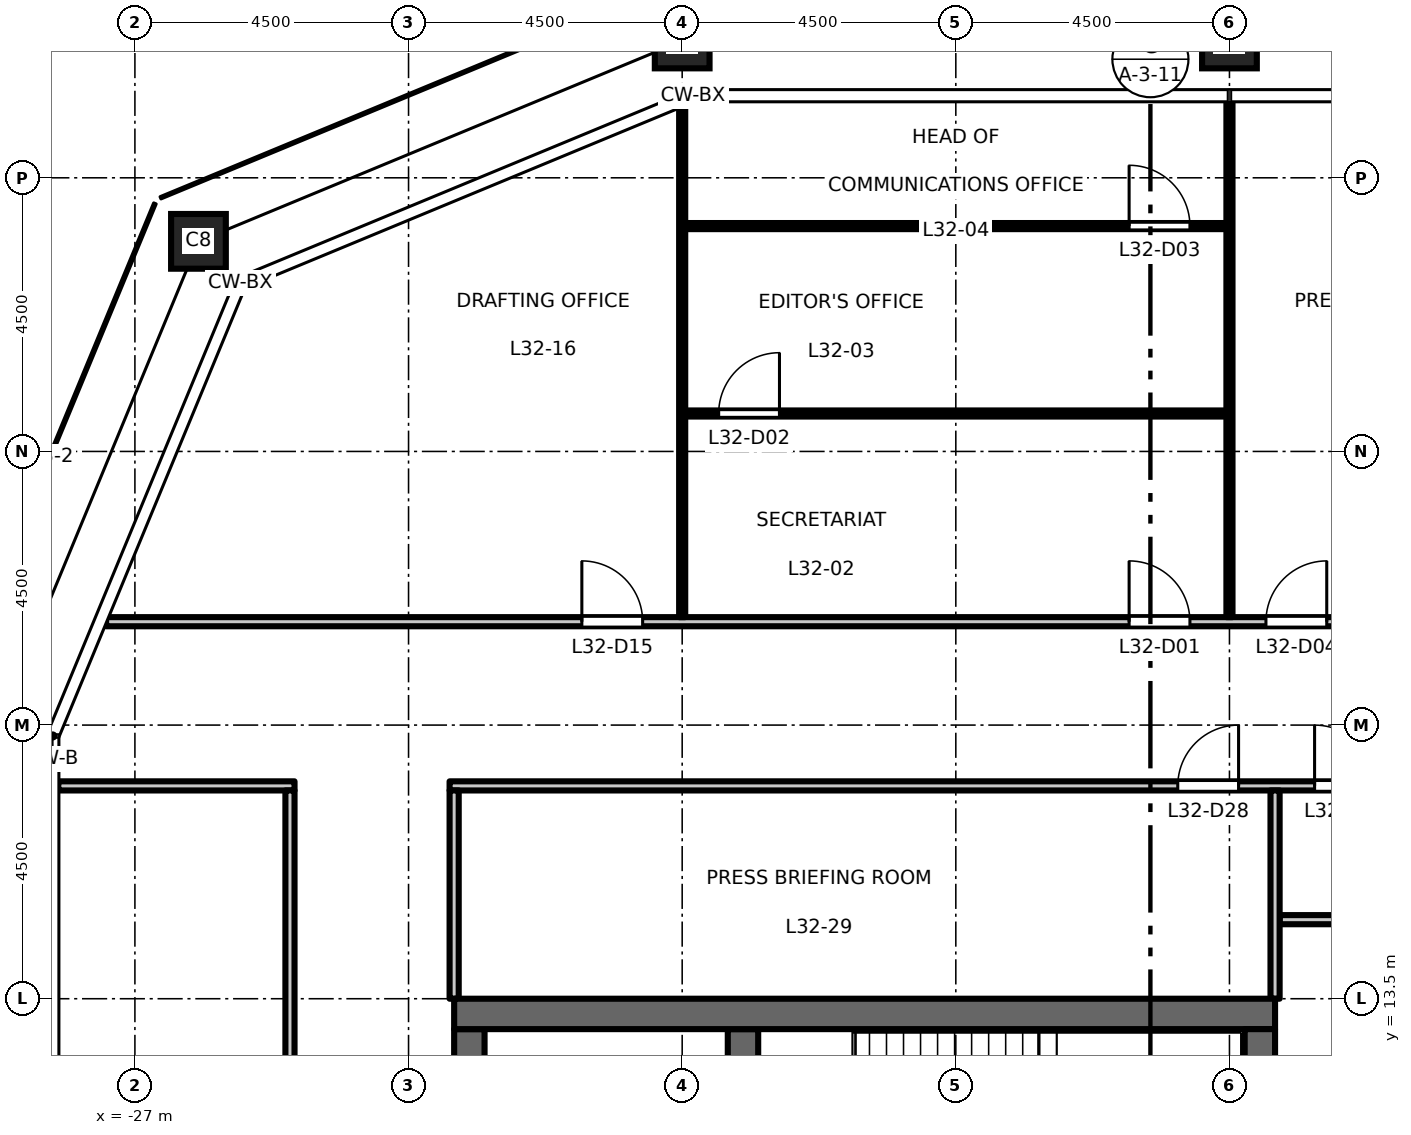
"""IFC4 building model, lengths in metres.
Left out: names, types, materials, properties, quantities, classifications, styles, units other than length and angle.
Written with IfcOpenShell. Run it as: python <this file> out.ifc"""

import sys

from ifc_helpers import new_model, si_unit, direction, frame, frame_2d, origin, origin_2d, place, context, subcontext, project, spatial, rectangle, hollow_rectangle, extrude, element, fill, save


model = new_model("IFC4")
c1 = context("Model", 3, precision=1e-05, world=origin(), true_north=direction((0.0, 1.0)))
c2 = subcontext(c1, "Body", "Model", "MODEL_VIEW")
j1 = project(units=[si_unit("LENGTHUNIT", "METRE"), si_unit("PLANEANGLEUNIT", "RADIAN")], contexts=[c1])
p1 = place(None, origin())
s1 = spatial("IfcSite", under=j1, at=p1, CompositionType="ELEMENT")
p2 = place(p1, origin())
s2 = spatial("IfcBuilding", under=s1, at=p2, CompositionType="ELEMENT")
p3 = place(p2, frame((0.0, 0.0, 149.7)))
s3 = spatial("IfcBuildingStorey", under=s2, at=p3, CompositionType="ELEMENT", Elevation=149.7)
for number, where, z_axis, x_axis in (
    (1, (-9.0, 29.25, 0.0), (0.0, 0.0, 1.0), (1.0, 0.0, 0.0)),
    (2, (-18.0, 29.25, 0.0), (0.0, 0.0, 1.0), (1.0, 0.0, 0.0)),
    (3, (-25.955, 25.955, 0.0), (0.0, 0.0, 1.0), (1.0, 0.0, 0.0)),
):
    element("IfcColumn", number, at=place(p3, frame(where, z_axis=z_axis, x_axis=x_axis)), inside=s3, PredefinedType="COLUMN", context=c2, shape_type="SweptSolid", body=[
        extrude(hollow_rectangle(XDim=0.9, YDim=0.9, WallThickness=0.05, at=origin_2d()), origin(), (0.0, 0.0, 1.0), 4.5),
    ])
p4 = place(p3, frame((-21.5, -13.0, 0.0), z_axis=(0.0, 0.0, 1.0), x_axis=(0.0, 1.0, 0.0)))
e4 = element("IfcWall", 4, at=p4, inside=s3, PredefinedType="SHEAR", context=c2, shape_type="SweptSolid", body=[
    extrude(rectangle(XDim=26.0, YDim=0.5, at=frame_2d((13.0, 0.0))), origin(), (0.0, 0.0, 1.0), 4.35),
])
p5 = place(p4, frame((16.825, 0.0, 0.0)))
e5 = element("IfcOpeningElement", 5, at=p5, cuts=e4, PredefinedType="OPENING", context=c2, shape_type="SweptSolid", body=[
    extrude(rectangle(XDim=1.8, YDim=2.1, at=frame_2d((0.9, 1.05))), frame((0.0, 0.26, 0.0), z_axis=(0.0, -1.0, 0.0), x_axis=(1.0, 0.0, 0.0)), (0.0, 0.0, 1.0), 0.52),
])
p6 = place(p4, frame((7.375, 0.0, 0.0)))
e6 = element("IfcOpeningElement", 6, at=p6, cuts=e4, PredefinedType="OPENING", context=c2, shape_type="SweptSolid", body=[
    extrude(rectangle(XDim=1.8, YDim=2.1, at=frame_2d((0.9, 1.05))), frame((0.0, 0.26, 0.0), z_axis=(0.0, -1.0, 0.0), x_axis=(1.0, 0.0, 0.0)), (0.0, 0.0, 1.0), 0.52),
])
p7 = place(p4, frame((1.3, 0.0, 0.0)))
e7 = element("IfcOpeningElement", 7, at=p7, cuts=e4, PredefinedType="OPENING", context=c2, shape_type="SweptSolid", body=[
    extrude(rectangle(XDim=0.9, YDim=2.1, at=frame_2d((0.45, 1.05))), frame((0.0, 0.26, 0.0), z_axis=(0.0, -1.0, 0.0), x_axis=(1.0, 0.0, 0.0)), (0.0, 0.0, 1.0), 0.52),
])
p8 = place(p3, frame((-17.0, 6.425, 0.0), z_axis=(0.0, 0.0, 1.0), x_axis=(0.0, 1.0, 0.0)))
e8 = element("IfcWall", 8, at=p8, inside=s3, PredefinedType="SHEAR", context=c2, shape_type="SweptSolid", body=[
    extrude(rectangle(XDim=6.575, YDim=0.5, at=frame_2d((3.288, 0.0))), origin(), (0.0, 0.0, 1.0), 4.35),
])
p9 = place(p3, frame((-8.25, 13.25, 0.0), z_axis=(0.0, 0.0, 1.0), x_axis=(-1.0, 0.0, 0.0)))
e9 = element("IfcWall", 9, at=p9, inside=s3, PredefinedType="SHEAR", context=c2, shape_type="SweptSolid", body=[
    extrude(rectangle(XDim=13.5, YDim=0.5, at=frame_2d((6.75, 0.0))), origin(), (0.0, 0.0, 1.0), 4.35),
])
p10 = place(p3, frame((-8.5, -13.0, 0.0), z_axis=(0.0, 0.0, 1.0), x_axis=(0.0, 1.0, 0.0)))
e10 = element("IfcWall", 10, at=p10, inside=s3, PredefinedType="SHEAR", context=c2, shape_type="SweptSolid", body=[
    extrude(rectangle(XDim=26.0, YDim=0.5, at=frame_2d((13.0, 0.0))), origin(), (0.0, 0.0, 1.0), 4.35),
])
p11 = place(p3, frame((-8.175, 14.8, 0.0), z_axis=(0.0, 0.0, 1.0), x_axis=(1.0, 0.0, 0.0)))
e11 = element("IfcWall", 11, at=p11, inside=s3, PredefinedType="PARTITIONING", context=c2, shape_type="SweptSolid", body=[
    extrude(rectangle(XDim=14.955, YDim=0.15, at=frame_2d((7.478, 0.0))), origin(), (0.0, 0.0, 1.0), 4.35),
])
p12 = place(p11, frame((4.325, 0.0, 0.0)))
e12 = element("IfcOpeningElement", 12, at=p12, cuts=e11, PredefinedType="OPENING", context=c2, shape_type="SweptSolid", body=[
    extrude(rectangle(XDim=1.0, YDim=2.1, at=frame_2d((0.5, 1.05))), frame((0.0, 0.085, 0.0), z_axis=(0.0, -1.0, 0.0), x_axis=(1.0, 0.0, 0.0)), (0.0, 0.0, 1.0), 0.17),
])
p13 = place(p11, frame((6.575, 0.0, 0.0)))
e13 = element("IfcOpeningElement", 13, at=p13, cuts=e11, PredefinedType="OPENING", context=c2, shape_type="SweptSolid", body=[
    extrude(rectangle(XDim=1.0, YDim=2.1, at=frame_2d((0.5, 1.05))), frame((0.0, 0.085, 0.0), z_axis=(0.0, -1.0, 0.0), x_axis=(1.0, 0.0, 0.0)), (0.0, 0.0, 1.0), 0.17),
])
p14 = place(p11, frame((13.325, 0.0, 0.0)))
e14 = element("IfcOpeningElement", 14, at=p14, cuts=e11, PredefinedType="OPENING", context=c2, shape_type="SweptSolid", body=[
    extrude(rectangle(XDim=1.0, YDim=2.1, at=frame_2d((0.5, 1.05))), frame((0.0, 0.085, 0.0), z_axis=(0.0, -1.0, 0.0), x_axis=(1.0, 0.0, 0.0)), (0.0, 0.0, 1.0), 0.17),
])
p15 = place(p3, frame((-28.26, 17.0, 0.0), z_axis=(0.0, 0.0, 1.0), x_axis=(1.0, 0.0, 0.0)))
e15 = element("IfcWall", 15, at=p15, inside=s3, PredefinedType="PARTITIONING", context=c2, shape_type="SweptSolid", body=[
    extrude(rectangle(XDim=3.885, YDim=0.15, at=frame_2d((1.942, 0.0))), origin(), (0.0, 0.0, 1.0), 4.35),
])
p16 = place(p3, frame((-21.825, 17.0, 0.0), z_axis=(0.0, 0.0, 1.0), x_axis=(1.0, 0.0, 0.0)))
e16 = element("IfcWall", 16, at=p16, inside=s3, PredefinedType="PARTITIONING", context=c2, shape_type="SweptSolid", body=[
    extrude(rectangle(XDim=43.65, YDim=0.15, at=frame_2d((21.825, 0.0))), origin(), (0.0, 0.0, 1.0), 4.35),
])
p17 = place(p16, frame((14.225, 0.0, 0.0)))
e17 = element("IfcOpeningElement", 17, at=p17, cuts=e16, PredefinedType="OPENING", context=c2, shape_type="SweptSolid", body=[
    extrude(rectangle(XDim=1.0, YDim=2.1, at=frame_2d((0.5, 1.05))), frame((0.0, 0.085, 0.0), z_axis=(0.0, -1.0, 0.0), x_axis=(1.0, 0.0, 0.0)), (0.0, 0.0, 1.0), 0.17),
])
p18 = place(p16, frame((11.975, 0.0, 0.0)))
e18 = element("IfcOpeningElement", 18, at=p18, cuts=e16, PredefinedType="OPENING", context=c2, shape_type="SweptSolid", body=[
    extrude(rectangle(XDim=1.0, YDim=2.1, at=frame_2d((0.5, 1.05))), frame((0.0, 0.085, 0.0), z_axis=(0.0, -1.0, 0.0), x_axis=(1.0, 0.0, 0.0)), (0.0, 0.0, 1.0), 0.17),
])
p19 = place(p16, frame((30.725, 0.0, 0.0)))
e19 = element("IfcOpeningElement", 19, at=p19, cuts=e16, PredefinedType="OPENING", context=c2, shape_type="SweptSolid", body=[
    extrude(rectangle(XDim=1.0, YDim=2.1, at=frame_2d((0.5, 1.05))), frame((0.0, 0.085, 0.0), z_axis=(0.0, -1.0, 0.0), x_axis=(1.0, 0.0, 0.0)), (0.0, 0.0, 1.0), 0.17),
])
p20 = place(p3, frame((-27.474, 19.7, 0.0), z_axis=(0.0, 0.0, 1.0), x_axis=(1.0, 0.0, 0.0)))
e20 = element("IfcWall", 20, at=p20, inside=s3, PredefinedType="PARTITIONING", context=c2, shape_type="SweptSolid", body=[
    extrude(rectangle(XDim=54.948, YDim=0.15, at=frame_2d((27.474, 0.0))), origin(), (0.0, 0.0, 1.0), 4.35),
])
p21 = place(p20, frame((16.824, 0.0, 0.0)))
e21 = element("IfcOpeningElement", 21, at=p21, cuts=e20, PredefinedType="OPENING", context=c2, shape_type="SweptSolid", body=[
    extrude(rectangle(XDim=1.0, YDim=2.1, at=frame_2d((0.5, 1.05))), frame((0.0, 0.085, 0.0), z_axis=(0.0, -1.0, 0.0), x_axis=(1.0, 0.0, 0.0)), (0.0, 0.0, 1.0), 0.17),
])
p22 = place(p20, frame((19.074, 0.0, 0.0)))
e22 = element("IfcOpeningElement", 22, at=p22, cuts=e20, PredefinedType="OPENING", context=c2, shape_type="SweptSolid", body=[
    extrude(rectangle(XDim=1.0, YDim=2.1, at=frame_2d((0.5, 1.05))), frame((0.0, 0.085, 0.0), z_axis=(0.0, -1.0, 0.0), x_axis=(1.0, 0.0, 0.0)), (0.0, 0.0, 1.0), 0.17),
])
p23 = place(p20, frame((34.824, 0.0, 0.0)))
e23 = element("IfcOpeningElement", 23, at=p23, cuts=e20, PredefinedType="OPENING", context=c2, shape_type="SweptSolid", body=[
    extrude(rectangle(XDim=1.0, YDim=2.1, at=frame_2d((0.5, 1.05))), frame((0.0, 0.085, 0.0), z_axis=(0.0, -1.0, 0.0), x_axis=(1.0, 0.0, 0.0)), (0.0, 0.0, 1.0), 0.17),
])
p24 = place(p20, frame((37.074, 0.0, 0.0)))
e24 = element("IfcOpeningElement", 24, at=p24, cuts=e20, PredefinedType="OPENING", context=c2, shape_type="SweptSolid", body=[
    extrude(rectangle(XDim=1.0, YDim=2.1, at=frame_2d((0.5, 1.05))), frame((0.0, 0.085, 0.0), z_axis=(0.0, -1.0, 0.0), x_axis=(1.0, 0.0, 0.0)), (0.0, 0.0, 1.0), 0.17),
])
p25 = place(p20, frame((7.824, 0.0, 0.0)))
e25 = element("IfcOpeningElement", 25, at=p25, cuts=e20, PredefinedType="OPENING", context=c2, shape_type="SweptSolid", body=[
    extrude(rectangle(XDim=1.0, YDim=2.1, at=frame_2d((0.5, 1.05))), frame((0.0, 0.085, 0.0), z_axis=(0.0, -1.0, 0.0), x_axis=(1.0, 0.0, 0.0)), (0.0, 0.0, 1.0), 0.17),
])
p26 = place(p20, frame((46.048, 0.0, 0.0)))
e26 = element("IfcOpeningElement", 26, at=p26, cuts=e20, PredefinedType="OPENING", context=c2, shape_type="SweptSolid", body=[
    extrude(rectangle(XDim=1.0, YDim=2.1, at=frame_2d((0.5, 1.05))), frame((0.0, 0.085, 0.0), z_axis=(0.0, -1.0, 0.0), x_axis=(1.0, 0.0, 0.0)), (0.0, 0.0, 1.0), 0.17),
])
p27 = place(p3, frame((-17.95, 23.124, 0.0), z_axis=(0.0, 0.0, 1.0), x_axis=(1.0, 0.0, 0.0)))
e27 = element("IfcWall", 27, at=p27, inside=s3, PredefinedType="PARTITIONING", context=c2, shape_type="SweptSolid", body=[
    extrude(rectangle(XDim=8.9, YDim=0.1, at=frame_2d((4.45, 0.0))), origin(), (0.0, 0.0, 1.0), 4.35),
])
p28 = place(p27, frame((0.55, 0.0, 0.0)))
e28 = element("IfcOpeningElement", 28, at=p28, cuts=e27, PredefinedType="OPENING", context=c2, shape_type="SweptSolid", body=[
    extrude(rectangle(XDim=1.0, YDim=2.1, at=frame_2d((0.5, 1.05))), frame((0.0, 0.06, 0.0), z_axis=(0.0, -1.0, 0.0), x_axis=(1.0, 0.0, 0.0)), (0.0, 0.0, 1.0), 0.12),
])
p29 = place(p3, frame((-17.95, 26.206, 0.0), z_axis=(0.0, 0.0, 1.0), x_axis=(1.0, 0.0, 0.0)))
e29 = element("IfcWall", 29, at=p29, inside=s3, PredefinedType="PARTITIONING", context=c2, shape_type="SweptSolid", body=[
    extrude(rectangle(XDim=8.9, YDim=0.1, at=frame_2d((4.45, 0.0))), origin(), (0.0, 0.0, 1.0), 4.35),
])
p30 = place(p29, frame((7.3, 0.0, 0.0)))
e30 = element("IfcOpeningElement", 30, at=p30, cuts=e29, PredefinedType="OPENING", context=c2, shape_type="SweptSolid", body=[
    extrude(rectangle(XDim=1.0, YDim=2.1, at=frame_2d((0.5, 1.05))), frame((0.0, 0.06, 0.0), z_axis=(0.0, -1.0, 0.0), x_axis=(1.0, 0.0, 0.0)), (0.0, 0.0, 1.0), 0.12),
])
p31 = place(p3, frame((-24.45, -16.925, 0.0), z_axis=(0.0, 0.0, 1.0), x_axis=(0.0, 1.0, 0.0)))
e31 = element("IfcWall", 31, at=p31, inside=s3, PredefinedType="PARTITIONING", context=c2, shape_type="SweptSolid", body=[
    extrude(rectangle(XDim=33.85, YDim=0.15, at=frame_2d((16.925, 0.0))), origin(), (0.0, 0.0, 1.0), 4.35),
])
p32 = place(p31, frame((0.525, 0.0, 0.0)))
e32 = element("IfcOpeningElement", 32, at=p32, cuts=e31, PredefinedType="OPENING", context=c2, shape_type="SweptSolid", body=[
    extrude(rectangle(XDim=1.0, YDim=2.1, at=frame_2d((0.5, 1.05))), frame((0.0, 0.085, 0.0), z_axis=(0.0, -1.0, 0.0), x_axis=(1.0, 0.0, 0.0)), (0.0, 0.0, 1.0), 0.17),
])
p33 = place(p3, frame((-21.75, 13.5, 0.0), z_axis=(0.0, 0.0, 1.0), x_axis=(0.0, 1.0, 0.0)))
e33 = element("IfcWall", 33, at=p33, inside=s3, PredefinedType="PARTITIONING", context=c2, shape_type="SweptSolid", body=[
    extrude(rectangle(XDim=3.425, YDim=0.15, at=frame_2d((1.712, 0.0))), origin(), (0.0, 0.0, 1.0), 4.35),
])
p34 = place(p3, frame((-18.0, 19.775, 0.0), z_axis=(0.0, 0.0, 1.0), x_axis=(0.0, 1.0, 0.0)))
e34 = element("IfcWall", 34, at=p34, inside=s3, PredefinedType="PARTITIONING", context=c2, shape_type="SweptSolid", body=[
    extrude(rectangle(XDim=8.403, YDim=0.1, at=frame_2d((4.202, 0.0))), origin(), (0.0, 0.0, 1.0), 3.45),
])
p35 = place(p3, frame((-9.0, 19.775, 0.0), z_axis=(0.0, 0.0, 1.0), x_axis=(0.0, 1.0, 0.0)))
e35 = element("IfcWall", 35, at=p35, inside=s3, PredefinedType="PARTITIONING", context=c2, shape_type="SweptSolid", body=[
    extrude(rectangle(XDim=8.485, YDim=0.1, at=frame_2d((4.243, 0.0))), origin(), (0.0, 0.0, 1.0), 3.45),
])
p36 = place(p3, frame((-8.25, 13.5, 0.0), z_axis=(0.0, 0.0, 1.0), x_axis=(0.0, 1.0, 0.0)))
e36 = element("IfcWall", 36, at=p36, inside=s3, PredefinedType="PARTITIONING", context=c2, shape_type="SweptSolid", body=[
    extrude(rectangle(XDim=3.425, YDim=0.15, at=frame_2d((1.712, 0.0))), origin(), (0.0, 0.0, 1.0), 4.35),
])
p37 = place(p21, origin())
e37 = element("IfcDoor", 37, at=p37, inside=s3, OperationType="SINGLE_SWING_LEFT", PredefinedType="DOOR", context=c2, shape_type="SweptSolid", body=[
    extrude(rectangle(XDim=1.0, YDim=2.1, at=frame_2d((0.5, 1.05))), frame((0.0, 0.025, 0.0), z_axis=(0.0, -1.0, 0.0), x_axis=(1.0, 0.0, 0.0)), (0.0, 0.0, 1.0), 0.05),
])
fill(e21, e37)
p38 = place(p28, origin())
e38 = element("IfcDoor", 38, at=p38, inside=s3, OperationType="SINGLE_SWING_RIGHT", PredefinedType="DOOR", context=c2, shape_type="SweptSolid", body=[
    extrude(rectangle(XDim=1.0, YDim=2.1, at=frame_2d((0.5, 1.05))), frame((0.0, 0.025, 0.0), z_axis=(0.0, -1.0, 0.0), x_axis=(1.0, 0.0, 0.0)), (0.0, 0.0, 1.0), 0.05),
])
fill(e28, e38)
p39 = place(p30, origin())
e39 = element("IfcDoor", 39, at=p39, inside=s3, OperationType="SINGLE_SWING_LEFT", PredefinedType="DOOR", context=c2, shape_type="SweptSolid", body=[
    extrude(rectangle(XDim=1.0, YDim=2.1, at=frame_2d((0.5, 1.05))), frame((0.0, 0.025, 0.0), z_axis=(0.0, -1.0, 0.0), x_axis=(1.0, 0.0, 0.0)), (0.0, 0.0, 1.0), 0.05),
])
fill(e30, e39)
p40 = place(p22, origin())
e40 = element("IfcDoor", 40, at=p40, inside=s3, OperationType="SINGLE_SWING_RIGHT", PredefinedType="DOOR", context=c2, shape_type="SweptSolid", body=[
    extrude(rectangle(XDim=1.0, YDim=2.1, at=frame_2d((0.5, 1.05))), frame((0.0, 0.025, 0.0), z_axis=(0.0, -1.0, 0.0), x_axis=(1.0, 0.0, 0.0)), (0.0, 0.0, 1.0), 0.05),
])
fill(e22, e40)
p41 = place(p25, origin())
e41 = element("IfcDoor", 41, at=p41, inside=s3, OperationType="SINGLE_SWING_LEFT", PredefinedType="DOOR", context=c2, shape_type="SweptSolid", body=[
    extrude(rectangle(XDim=1.0, YDim=2.1, at=frame_2d((0.5, 1.05))), frame((0.0, 0.025, 0.0), z_axis=(0.0, -1.0, 0.0), x_axis=(1.0, 0.0, 0.0)), (0.0, 0.0, 1.0), 0.05),
])
fill(e25, e41)
p42 = place(p17, origin())
e42 = element("IfcDoor", 42, at=p42, inside=s3, OperationType="SINGLE_SWING_LEFT", PredefinedType="DOOR", context=c2, shape_type="SweptSolid", body=[
    extrude(rectangle(XDim=1.0, YDim=2.1, at=frame_2d((0.5, 1.05))), frame((0.0, 0.025, 0.0), z_axis=(0.0, -1.0, 0.0), x_axis=(1.0, 0.0, 0.0)), (0.0, 0.0, 1.0), 0.05),
])
fill(e17, e42)
p43 = place(p18, origin())
e43 = element("IfcDoor", 43, at=p43, inside=s3, OperationType="SINGLE_SWING_RIGHT", PredefinedType="DOOR", context=c2, shape_type="SweptSolid", body=[
    extrude(rectangle(XDim=1.0, YDim=2.1, at=frame_2d((0.5, 1.05))), frame((0.0, 0.025, 0.0), z_axis=(0.0, -1.0, 0.0), x_axis=(1.0, 0.0, 0.0)), (0.0, 0.0, 1.0), 0.05),
])
fill(e18, e43)
save(model, sys.argv[1])
